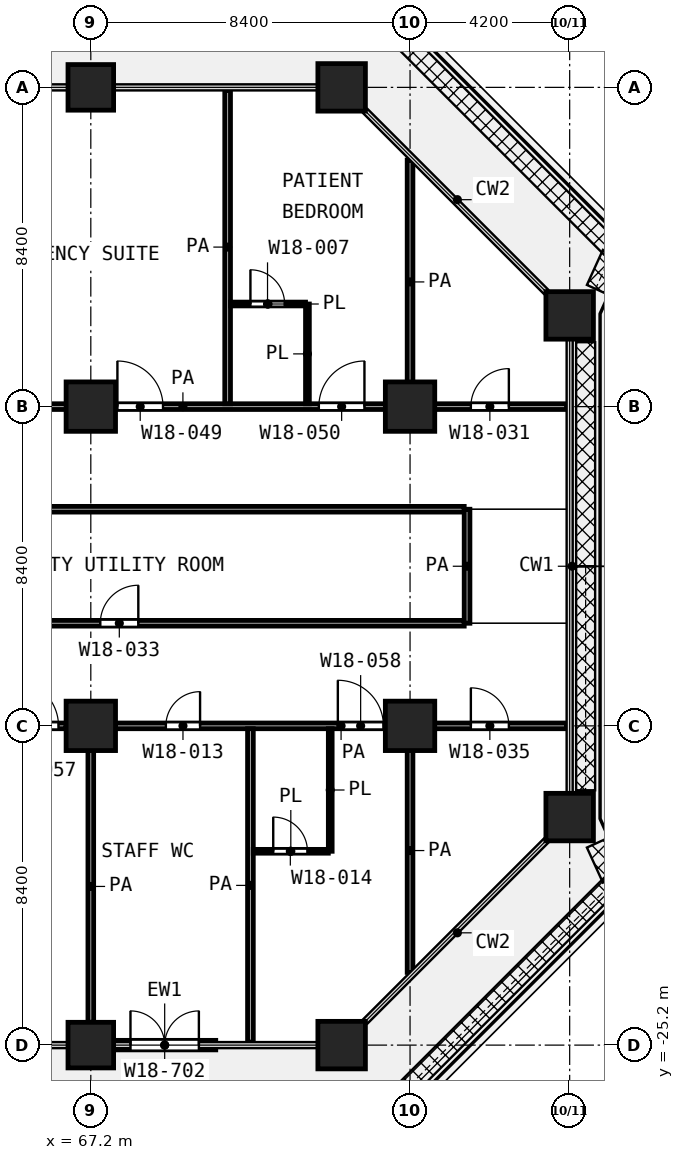
"""IFC4 building model, lengths in metres.
Left out: names, types, materials, properties, quantities, classifications, styles, units other than length and angle.
Written with IfcOpenShell. Run it as: python <this file> out.ifc"""

import sys

from ifc_helpers import new_model, si_unit, direction, frame, frame_2d, origin, origin_2d, place, context, subcontext, project, spatial, rectangle, extrude, element, fill, save


model = new_model("IFC4")
c1 = context("Model", 3, precision=1e-05, world=origin(), true_north=direction((0.0, 1.0)))
c2 = subcontext(c1, "Body", "Model", "MODEL_VIEW")
j1 = project(units=[si_unit("LENGTHUNIT", "METRE"), si_unit("PLANEANGLEUNIT", "RADIAN")], contexts=[c1])
p1 = place(None, origin())
s1 = spatial("IfcSite", under=j1, at=p1, CompositionType="ELEMENT")
p2 = place(p1, origin())
s2 = spatial("IfcBuilding", under=s1, at=p2, CompositionType="ELEMENT")
p3 = place(p2, frame((0.0, 0.0, 81.2)))
s3 = spatial("IfcBuildingStorey", under=s2, at=p3, CompositionType="ELEMENT", Elevation=81.2)
p4 = place(p3, frame((67.2, 0.0, 0.0), z_axis=(0.0, 0.0, 1.0), x_axis=(1.0, 0.0, 0.0)))
e1 = element("IfcColumn", 1, at=p4, inside=s3, PredefinedType="COLUMN", context=c2, shape_type="SweptSolid", body=[
    extrude(rectangle(XDim=1.2, YDim=1.2, at=origin_2d()), origin(), (0.0, 0.0, 1.0), 4.2),
])
for number, where, z_axis, x_axis in (
    (2, (73.8, 0.0, 0.0), (0.0, 0.0, 1.0), (1.0, 0.0, 0.0)),
    (3, (79.8, -6.0, 0.0), (0.0, 0.0, 1.0), (1.0, 0.0, 0.0)),
):
    element("IfcColumn", number, at=place(p3, frame(where, z_axis=z_axis, x_axis=x_axis)), inside=s3, PredefinedType="COLUMN", context=c2, shape_type="SweptSolid", body=[
        extrude(rectangle(XDim=1.25, YDim=1.25, at=origin_2d()), origin(), (0.0, 0.0, 1.0), 4.2),
    ])
for number, where, z_axis, x_axis in (
    (4, (67.2, -8.4, 0.0), (0.0, 0.0, 1.0), (1.0, 0.0, 0.0)),
    (5, (75.6, -8.4, 0.0), (0.0, 0.0, 1.0), (1.0, 0.0, 0.0)),
    (6, (67.2, -16.8, 0.0), (0.0, 0.0, 1.0), (1.0, 0.0, 0.0)),
    (7, (75.6, -16.8, 0.0), (0.0, 0.0, 1.0), (1.0, 0.0, 0.0)),
):
    element("IfcColumn", number, at=place(p3, frame(where, z_axis=z_axis, x_axis=x_axis)), inside=s3, PredefinedType="COLUMN", context=c2, shape_type="SweptSolid", body=[
        extrude(rectangle(XDim=1.3, YDim=1.3, at=origin_2d()), origin(), (0.0, 0.0, 1.0), 4.2),
    ])
p5 = place(p3, frame((79.8, -19.2, 0.0), z_axis=(0.0, 0.0, 1.0), x_axis=(1.0, 0.0, 0.0)))
e8 = element("IfcColumn", 8, at=p5, inside=s3, PredefinedType="COLUMN", context=c2, shape_type="SweptSolid", body=[
    extrude(rectangle(XDim=1.25, YDim=1.25, at=origin_2d()), origin(), (0.0, 0.0, 1.0), 4.2),
])
p6 = place(p3, frame((67.2, -25.2, 0.0), z_axis=(0.0, 0.0, 1.0), x_axis=(1.0, 0.0, 0.0)))
e9 = element("IfcColumn", 9, at=p6, inside=s3, PredefinedType="COLUMN", context=c2, shape_type="SweptSolid", body=[
    extrude(rectangle(XDim=1.2, YDim=1.2, at=origin_2d()), origin(), (0.0, 0.0, 1.0), 4.2),
])
p7 = place(p3, frame((73.8, -25.2, 0.0), z_axis=(0.0, 0.0, 1.0), x_axis=(1.0, 0.0, 0.0)))
e10 = element("IfcColumn", 10, at=p7, inside=s3, PredefinedType="COLUMN", context=c2, shape_type="SweptSolid", body=[
    extrude(rectangle(XDim=1.25, YDim=1.25, at=origin_2d()), origin(), (0.0, 0.0, 1.0), 4.2),
])
p8 = place(p3, frame((67.8, -25.2, 0.0), z_axis=(0.0, 0.0, 1.0), x_axis=(1.0, 0.0, 0.0)))
e11 = element("IfcWall", 11, at=p8, inside=s3, PredefinedType="SOLIDWALL", context=c2, shape_type="SweptSolid", body=[
    extrude(rectangle(XDim=2.688, YDim=0.25, at=frame_2d((1.344, 0.0))), origin(), (0.0, 0.0, 1.0), 3.78),
])
p9 = place(p8, frame((0.444, 0.0, 0.0)))
e12 = element("IfcOpeningElement", 12, at=p9, cuts=e11, PredefinedType="OPENING", context=c2, shape_type="SweptSolid", body=[
    extrude(rectangle(XDim=1.8, YDim=2.1, at=frame_2d((0.9, 1.05))), frame((0.0, 0.135, 0.0), z_axis=(0.0, -1.0, 0.0), x_axis=(1.0, 0.0, 0.0)), (0.0, 0.0, 1.0), 0.27),
])
p10 = place(p3, frame((71.475, -20.1, 0.0), z_axis=(0.0, 0.0, 1.0), x_axis=(1.0, 0.0, 0.0)))
e13 = element("IfcWall", 13, at=p10, inside=s3, PredefinedType="PARTITIONING", context=c2, shape_type="SweptSolid", body=[
    extrude(rectangle(XDim=1.975, YDim=0.1, at=frame_2d((0.987, 0.0))), origin(), (0.0, 0.0, 1.0), 3.9),
])
p11 = place(p10, frame((0.525, 0.0, 0.0)))
e14 = element("IfcOpeningElement", 14, at=p11, cuts=e13, PredefinedType="OPENING", context=c2, shape_type="SweptSolid", body=[
    extrude(rectangle(XDim=0.9, YDim=2.1, at=frame_2d((0.45, 1.05))), frame((0.0, 0.06, 0.0), z_axis=(0.0, -1.0, 0.0), x_axis=(1.0, 0.0, 0.0)), (0.0, 0.0, 1.0), 0.12),
])
p12 = place(p3, frame((70.875, -5.7, 0.0), z_axis=(0.0, 0.0, 1.0), x_axis=(1.0, 0.0, 0.0)))
e15 = element("IfcWall", 15, at=p12, inside=s3, PredefinedType="PARTITIONING", context=c2, shape_type="SweptSolid", body=[
    extrude(rectangle(XDim=1.975, YDim=0.1, at=frame_2d((0.988, 0.0))), origin(), (0.0, 0.0, 1.0), 3.9),
])
p13 = place(p12, frame((0.525, 0.0, 0.0)))
e16 = element("IfcOpeningElement", 16, at=p13, cuts=e15, PredefinedType="OPENING", context=c2, shape_type="SweptSolid", body=[
    extrude(rectangle(XDim=0.9, YDim=2.1, at=frame_2d((0.45, 1.05))), frame((0.0, 0.06, 0.0), z_axis=(0.0, -1.0, 0.0), x_axis=(1.0, 0.0, 0.0)), (0.0, 0.0, 1.0), 0.12),
])
p14 = place(p3, frame((72.9, -8.325, 0.0), z_axis=(0.0, 0.0, 1.0), x_axis=(0.0, 1.0, 0.0)))
e17 = element("IfcWall", 17, at=p14, inside=s3, PredefinedType="PARTITIONING", context=c2, shape_type="SweptSolid", body=[
    extrude(rectangle(XDim=2.625, YDim=0.1, at=frame_2d((1.312, 0.0))), origin(), (0.0, 0.0, 1.0), 3.9),
])
p15 = place(p3, frame((73.5, -20.1, 0.0), z_axis=(0.0, 0.0, 1.0), x_axis=(0.0, 1.0, 0.0)))
e18 = element("IfcWall", 18, at=p15, inside=s3, PredefinedType="PARTITIONING", context=c2, shape_type="SweptSolid", body=[
    extrude(rectangle(XDim=3.225, YDim=0.1, at=frame_2d((1.613, 0.0))), origin(), (0.0, 0.0, 1.0), 3.9),
])
p16 = place(p3, frame((25.1, -16.8, 0.0), z_axis=(0.0, 0.0, 1.0), x_axis=(1.0, 0.0, 0.0)))
e19 = element("IfcWall", 19, at=p16, inside=s3, PredefinedType="PARTITIONING", context=c2, shape_type="SweptSolid", body=[
    extrude(rectangle(XDim=41.45, YDim=0.15, at=frame_2d((20.725, 0.0))), origin(), (0.0, 0.0, 1.0), 3.9),
])
p17 = place(p16, frame((1.45, 0.0, 0.0)))
e20 = element("IfcOpeningElement", 20, at=p17, cuts=e19, PredefinedType="OPENING", context=c2, shape_type="SweptSolid", body=[
    extrude(rectangle(XDim=1.5, YDim=2.1, at=frame_2d((0.75, 1.05))), frame((0.0, 0.085, 0.0), z_axis=(0.0, -1.0, 0.0), x_axis=(1.0, 0.0, 0.0)), (0.0, 0.0, 1.0), 0.17),
])
p18 = place(p16, frame((5.9, 0.0, 0.0)))
e21 = element("IfcOpeningElement", 21, at=p18, cuts=e19, PredefinedType="OPENING", context=c2, shape_type="SweptSolid", body=[
    extrude(rectangle(XDim=1.0, YDim=2.1, at=frame_2d((0.5, 1.05))), frame((0.0, 0.085, 0.0), z_axis=(0.0, -1.0, 0.0), x_axis=(1.0, 0.0, 0.0)), (0.0, 0.0, 1.0), 0.17),
])
p19 = place(p16, frame((10.3, 0.0, 0.0)))
e22 = element("IfcOpeningElement", 22, at=p19, cuts=e19, PredefinedType="OPENING", context=c2, shape_type="SweptSolid", body=[
    extrude(rectangle(XDim=1.2, YDim=2.1, at=frame_2d((0.6, 1.05))), frame((0.0, 0.085, 0.0), z_axis=(0.0, -1.0, 0.0), x_axis=(1.0, 0.0, 0.0)), (0.0, 0.0, 1.0), 0.17),
])
p20 = place(p16, frame((15.0, 0.0, 0.0)))
e23 = element("IfcOpeningElement", 23, at=p20, cuts=e19, PredefinedType="OPENING", context=c2, shape_type="SweptSolid", body=[
    extrude(rectangle(XDim=1.2, YDim=2.1, at=frame_2d((0.6, 1.05))), frame((0.0, 0.085, 0.0), z_axis=(0.0, -1.0, 0.0), x_axis=(1.0, 0.0, 0.0)), (0.0, 0.0, 1.0), 0.17),
])
p21 = place(p16, frame((13.55, 0.0, 0.0)))
e24 = element("IfcOpeningElement", 24, at=p21, cuts=e19, PredefinedType="OPENING", context=c2, shape_type="SweptSolid", body=[
    extrude(rectangle(XDim=1.1, YDim=2.1, at=frame_2d((0.55, 1.05))), frame((0.0, 0.085, 0.0), z_axis=(0.0, -1.0, 0.0), x_axis=(1.0, 0.0, 0.0)), (0.0, 0.0, 1.0), 0.17),
])
p22 = place(p16, frame((23.4, 0.0, 0.0)))
e25 = element("IfcOpeningElement", 25, at=p22, cuts=e19, PredefinedType="OPENING", context=c2, shape_type="SweptSolid", body=[
    extrude(rectangle(XDim=1.2, YDim=2.1, at=frame_2d((0.6, 1.05))), frame((0.0, 0.085, 0.0), z_axis=(0.0, -1.0, 0.0), x_axis=(1.0, 0.0, 0.0)), (0.0, 0.0, 1.0), 0.17),
])
p23 = place(p16, frame((26.3, 0.0, 0.0)))
e26 = element("IfcOpeningElement", 26, at=p23, cuts=e19, PredefinedType="OPENING", context=c2, shape_type="SweptSolid", body=[
    extrude(rectangle(XDim=1.2, YDim=2.1, at=frame_2d((0.6, 1.05))), frame((0.0, 0.085, 0.0), z_axis=(0.0, -1.0, 0.0), x_axis=(1.0, 0.0, 0.0)), (0.0, 0.0, 1.0), 0.17),
])
p24 = place(p16, frame((34.9, 0.0, 0.0)))
e27 = element("IfcOpeningElement", 27, at=p24, cuts=e19, PredefinedType="OPENING", context=c2, shape_type="SweptSolid", body=[
    extrude(rectangle(XDim=1.2, YDim=2.1, at=frame_2d((0.6, 1.05))), frame((0.0, 0.085, 0.0), z_axis=(0.0, -1.0, 0.0), x_axis=(1.0, 0.0, 0.0)), (0.0, 0.0, 1.0), 0.17),
])
p25 = place(p16, frame((32.1, 0.0, 0.0)))
e28 = element("IfcOpeningElement", 28, at=p25, cuts=e19, PredefinedType="OPENING", context=c2, shape_type="SweptSolid", body=[
    extrude(rectangle(XDim=0.9, YDim=2.1, at=frame_2d((0.45, 1.05))), frame((0.0, 0.085, 0.0), z_axis=(0.0, -1.0, 0.0), x_axis=(1.0, 0.0, 0.0)), (0.0, 0.0, 1.0), 0.17),
])
p26 = place(p16, frame((40.05, 0.0, 0.0)))
e29 = element("IfcOpeningElement", 29, at=p26, cuts=e19, PredefinedType="OPENING", context=c2, shape_type="SweptSolid", body=[
    extrude(rectangle(XDim=1.2, YDim=2.1, at=frame_2d((0.6, 1.05))), frame((0.0, 0.085, 0.0), z_axis=(0.0, -1.0, 0.0), x_axis=(1.0, 0.0, 0.0)), (0.0, 0.0, 1.0), 0.17),
])
p27 = place(p3, frame((67.85, -16.8, 0.0), z_axis=(0.0, 0.0, 1.0), x_axis=(1.0, 0.0, 0.0)))
e30 = element("IfcWall", 30, at=p27, inside=s3, PredefinedType="PARTITIONING", context=c2, shape_type="SweptSolid", body=[
    extrude(rectangle(XDim=11.87, YDim=0.15, at=frame_2d((5.935, 0.0))), origin(), (0.0, 0.0, 1.0), 3.9),
])
p28 = place(p27, frame((1.325, 0.0, 0.0)))
e31 = element("IfcOpeningElement", 31, at=p28, cuts=e30, PredefinedType="OPENING", context=c2, shape_type="SweptSolid", body=[
    extrude(rectangle(XDim=0.9, YDim=2.1, at=frame_2d((0.45, 1.05))), frame((0.0, 0.085, 0.0), z_axis=(0.0, -1.0, 0.0), x_axis=(1.0, 0.0, 0.0)), (0.0, 0.0, 1.0), 0.17),
])
p29 = place(p27, frame((5.85, 0.0, 0.0)))
e32 = element("IfcOpeningElement", 32, at=p29, cuts=e30, PredefinedType="OPENING", context=c2, shape_type="SweptSolid", body=[
    extrude(rectangle(XDim=1.2, YDim=2.1, at=frame_2d((0.6, 1.05))), frame((0.0, 0.085, 0.0), z_axis=(0.0, -1.0, 0.0), x_axis=(1.0, 0.0, 0.0)), (0.0, 0.0, 1.0), 0.17),
])
p30 = place(p27, frame((9.35, 0.0, 0.0)))
e33 = element("IfcOpeningElement", 33, at=p30, cuts=e30, PredefinedType="OPENING", context=c2, shape_type="SweptSolid", body=[
    extrude(rectangle(XDim=1.0, YDim=2.1, at=frame_2d((0.5, 1.05))), frame((0.0, 0.085, 0.0), z_axis=(0.0, -1.0, 0.0), x_axis=(1.0, 0.0, 0.0)), (0.0, 0.0, 1.0), 0.17),
])
p31 = place(p3, frame((29.475, -14.1, 0.0), z_axis=(0.0, 0.0, 1.0), x_axis=(1.0, 0.0, 0.0)))
e34 = element("IfcWall", 34, at=p31, inside=s3, PredefinedType="PARTITIONING", context=c2, shape_type="SweptSolid", body=[
    extrude(rectangle(XDim=47.55, YDim=0.15, at=frame_2d((23.775, 0.0))), origin(), (0.0, 0.0, 1.0), 3.9),
])
p32 = place(p31, frame((7.825, 0.0, 0.0)))
e35 = element("IfcOpeningElement", 35, at=p32, cuts=e34, PredefinedType="OPENING", context=c2, shape_type="SweptSolid", body=[
    extrude(rectangle(XDim=1.0, YDim=2.1, at=frame_2d((0.5, 1.05))), frame((0.0, 0.085, 0.0), z_axis=(0.0, -1.0, 0.0), x_axis=(1.0, 0.0, 0.0)), (0.0, 0.0, 1.0), 0.17),
])
p33 = place(p31, frame((22.425, 0.0, 0.0)))
e36 = element("IfcOpeningElement", 36, at=p33, cuts=e34, PredefinedType="OPENING", context=c2, shape_type="SweptSolid", body=[
    extrude(rectangle(XDim=1.2, YDim=2.1, at=frame_2d((0.6, 1.05))), frame((0.0, 0.085, 0.0), z_axis=(0.0, -1.0, 0.0), x_axis=(1.0, 0.0, 0.0)), (0.0, 0.0, 1.0), 0.17),
])
p34 = place(p31, frame((37.975, 0.0, 0.0)))
e37 = element("IfcOpeningElement", 37, at=p34, cuts=e34, PredefinedType="OPENING", context=c2, shape_type="SweptSolid", body=[
    extrude(rectangle(XDim=1.0, YDim=2.1, at=frame_2d((0.5, 1.05))), frame((0.0, 0.085, 0.0), z_axis=(0.0, -1.0, 0.0), x_axis=(1.0, 0.0, 0.0)), (0.0, 0.0, 1.0), 0.17),
])
p35 = place(p3, frame((29.475, -11.1, 0.0), z_axis=(0.0, 0.0, 1.0), x_axis=(1.0, 0.0, 0.0)))
e38 = element("IfcWall", 38, at=p35, inside=s3, PredefinedType="PARTITIONING", context=c2, shape_type="SweptSolid", body=[
    extrude(rectangle(XDim=47.55, YDim=0.15, at=frame_2d((23.775, 0.0))), origin(), (0.0, 0.0, 1.0), 3.9),
])
p36 = place(p3, frame((59.527, -8.4, 0.0), z_axis=(0.0, 0.0, 1.0), x_axis=(1.0, 0.0, 0.0)))
e39 = element("IfcWall", 39, at=p36, inside=s3, PredefinedType="PARTITIONING", context=c2, shape_type="SweptSolid", body=[
    extrude(rectangle(XDim=20.193, YDim=0.15, at=frame_2d((10.096, 0.0))), origin(), (0.0, 0.0, 1.0), 3.9),
])
p37 = place(p36, frame((4.073, 0.0, 0.0)))
e40 = element("IfcOpeningElement", 40, at=p37, cuts=e39, PredefinedType="OPENING", context=c2, shape_type="SweptSolid", body=[
    extrude(rectangle(XDim=1.2, YDim=2.1, at=frame_2d((0.6, 1.05))), frame((0.0, 0.085, 0.0), z_axis=(0.0, -1.0, 0.0), x_axis=(1.0, 0.0, 0.0)), (0.0, 0.0, 1.0), 0.17),
])
p38 = place(p36, frame((8.373, 0.0, 0.0)))
e41 = element("IfcOpeningElement", 41, at=p38, cuts=e39, PredefinedType="OPENING", context=c2, shape_type="SweptSolid", body=[
    extrude(rectangle(XDim=1.2, YDim=2.1, at=frame_2d((0.6, 1.05))), frame((0.0, 0.085, 0.0), z_axis=(0.0, -1.0, 0.0), x_axis=(1.0, 0.0, 0.0)), (0.0, 0.0, 1.0), 0.17),
])
p39 = place(p36, frame((13.673, 0.0, 0.0)))
e42 = element("IfcOpeningElement", 42, at=p39, cuts=e39, PredefinedType="OPENING", context=c2, shape_type="SweptSolid", body=[
    extrude(rectangle(XDim=1.2, YDim=2.1, at=frame_2d((0.6, 1.05))), frame((0.0, 0.085, 0.0), z_axis=(0.0, -1.0, 0.0), x_axis=(1.0, 0.0, 0.0)), (0.0, 0.0, 1.0), 0.17),
])
p40 = place(p36, frame((17.673, 0.0, 0.0)))
e43 = element("IfcOpeningElement", 43, at=p40, cuts=e39, PredefinedType="OPENING", context=c2, shape_type="SweptSolid", body=[
    extrude(rectangle(XDim=1.0, YDim=2.1, at=frame_2d((0.5, 1.05))), frame((0.0, 0.085, 0.0), z_axis=(0.0, -1.0, 0.0), x_axis=(1.0, 0.0, 0.0)), (0.0, 0.0, 1.0), 0.17),
])
p41 = place(p3, frame((67.2, -24.6, 0.0), z_axis=(0.0, 0.0, 1.0), x_axis=(0.0, 1.0, 0.0)))
e44 = element("IfcWall", 44, at=p41, inside=s3, PredefinedType="PARTITIONING", context=c2, shape_type="SweptSolid", body=[
    extrude(rectangle(XDim=7.15, YDim=0.15, at=frame_2d((3.575, 0.0))), origin(), (0.0, 0.0, 1.0), 3.9),
])
p42 = place(p3, frame((70.8, -8.325, 0.0), z_axis=(0.0, 0.0, 1.0), x_axis=(0.0, 1.0, 0.0)))
e45 = element("IfcWall", 45, at=p42, inside=s3, PredefinedType="PARTITIONING", context=c2, shape_type="SweptSolid", body=[
    extrude(rectangle(XDim=8.245, YDim=0.15, at=frame_2d((4.123, 0.0))), origin(), (0.0, 0.0, 1.0), 3.9),
])
p43 = place(p3, frame((71.4, -25.12, 0.0), z_axis=(0.0, 0.0, 1.0), x_axis=(0.0, 1.0, 0.0)))
e46 = element("IfcWall", 46, at=p43, inside=s3, PredefinedType="PARTITIONING", context=c2, shape_type="SweptSolid", body=[
    extrude(rectangle(XDim=8.245, YDim=0.15, at=frame_2d((4.123, 0.0))), origin(), (0.0, 0.0, 1.0), 3.9),
])
p44 = place(p3, frame((75.6, -23.287, 0.0), z_axis=(0.0, 0.0, 1.0), x_axis=(0.0, 1.0, 0.0)))
e47 = element("IfcWall", 47, at=p44, inside=s3, PredefinedType="PARTITIONING", context=c2, shape_type="SweptSolid", body=[
    extrude(rectangle(XDim=6.412, YDim=0.15, at=frame_2d((3.206, 0.0))), origin(), (0.0, 0.0, 1.0), 3.9),
])
p45 = place(p3, frame((75.6, -8.325, 0.0), z_axis=(0.0, 0.0, 1.0), x_axis=(0.0, 1.0, 0.0)))
e48 = element("IfcWall", 48, at=p45, inside=s3, PredefinedType="PARTITIONING", context=c2, shape_type="SweptSolid", body=[
    extrude(rectangle(XDim=6.412, YDim=0.15, at=frame_2d((3.206, 0.0))), origin(), (0.0, 0.0, 1.0), 3.9),
])
p46 = place(p3, frame((77.1, -14.1, 0.0), z_axis=(0.0, 0.0, 1.0), x_axis=(0.0, 1.0, 0.0)))
e49 = element("IfcWall", 49, at=p46, inside=s3, PredefinedType="PARTITIONING", context=c2, shape_type="SweptSolid", body=[
    extrude(rectangle(XDim=3.0, YDim=0.15, at=frame_2d((1.5, 0.0))), origin(), (0.0, 0.0, 1.0), 3.9),
])
p47 = place(p9, origin())
e50 = element("IfcDoor", 50, at=p47, inside=s3, OperationType="DOUBLE_DOOR_SINGLE_SWING", PredefinedType="DOOR", context=c2, shape_type="SweptSolid", body=[
    extrude(rectangle(XDim=1.8, YDim=2.1, at=frame_2d((0.9, 1.05))), frame((0.0, 0.025, 0.0), z_axis=(0.0, -1.0, 0.0), x_axis=(1.0, 0.0, 0.0)), (0.0, 0.0, 1.0), 0.05),
])
fill(e12, e50)
p48 = place(p38, origin())
e51 = element("IfcDoor", 51, at=p48, inside=s3, OperationType="SINGLE_SWING_LEFT", PredefinedType="DOOR", context=c2, shape_type="SweptSolid", body=[
    extrude(rectangle(XDim=1.2, YDim=2.1, at=frame_2d((0.6, 1.05))), frame((0.0, 0.025, 0.0), z_axis=(0.0, -1.0, 0.0), x_axis=(1.0, 0.0, 0.0)), (0.0, 0.0, 1.0), 0.05),
])
fill(e41, e51)
p49 = place(p39, origin())
e52 = element("IfcDoor", 52, at=p49, inside=s3, OperationType="SINGLE_SWING_RIGHT", PredefinedType="DOOR", context=c2, shape_type="SweptSolid", body=[
    extrude(rectangle(XDim=1.2, YDim=2.1, at=frame_2d((0.6, 1.05))), frame((0.0, 0.025, 0.0), z_axis=(0.0, -1.0, 0.0), x_axis=(1.0, 0.0, 0.0)), (0.0, 0.0, 1.0), 0.05),
])
fill(e42, e52)
p50 = place(p13, origin())
e53 = element("IfcDoor", 53, at=p50, inside=s3, OperationType="SINGLE_SWING_LEFT", PredefinedType="DOOR", context=c2, shape_type="SweptSolid", body=[
    extrude(rectangle(XDim=0.9, YDim=2.1, at=frame_2d((0.45, 1.05))), frame((0.0, 0.025, 0.0), z_axis=(0.0, -1.0, 0.0), x_axis=(1.0, 0.0, 0.0)), (0.0, 0.0, 1.0), 0.05),
])
fill(e16, e53)
p51 = place(p40, origin())
e54 = element("IfcDoor", 54, at=p51, inside=s3, OperationType="SINGLE_SWING_RIGHT", PredefinedType="DOOR", context=c2, shape_type="SweptSolid", body=[
    extrude(rectangle(XDim=1.0, YDim=2.1, at=frame_2d((0.5, 1.05))), frame((0.0, 0.025, 0.0), z_axis=(0.0, -1.0, 0.0), x_axis=(1.0, 0.0, 0.0)), (0.0, 0.0, 1.0), 0.05),
])
fill(e43, e54)
p52 = place(p34, origin())
e55 = element("IfcDoor", 55, at=p52, inside=s3, OperationType="SINGLE_SWING_RIGHT", PredefinedType="DOOR", context=c2, shape_type="SweptSolid", body=[
    extrude(rectangle(XDim=1.0, YDim=2.1, at=frame_2d((0.5, 1.05))), frame((0.0, 0.025, 0.0), z_axis=(0.0, -1.0, 0.0), x_axis=(1.0, 0.0, 0.0)), (0.0, 0.0, 1.0), 0.05),
])
fill(e37, e55)
p53 = place(p26, origin())
e56 = element("IfcDoor", 56, at=p53, inside=s3, OperationType="SINGLE_SWING_LEFT", PredefinedType="DOOR", context=c2, shape_type="SweptSolid", body=[
    extrude(rectangle(XDim=1.2, YDim=2.1, at=frame_2d((0.6, 1.05))), frame((0.0, 0.025, 0.0), z_axis=(0.0, -1.0, 0.0), x_axis=(1.0, 0.0, 0.0)), (0.0, 0.0, 1.0), 0.05),
])
fill(e29, e56)
p54 = place(p28, origin())
e57 = element("IfcDoor", 57, at=p54, inside=s3, OperationType="SINGLE_SWING_RIGHT", PredefinedType="DOOR", context=c2, shape_type="SweptSolid", body=[
    extrude(rectangle(XDim=0.9, YDim=2.1, at=frame_2d((0.45, 1.05))), frame((0.0, 0.025, 0.0), z_axis=(0.0, -1.0, 0.0), x_axis=(1.0, 0.0, 0.0)), (0.0, 0.0, 1.0), 0.05),
])
fill(e31, e57)
p55 = place(p29, origin())
e58 = element("IfcDoor", 58, at=p55, inside=s3, OperationType="SINGLE_SWING_LEFT", PredefinedType="DOOR", context=c2, shape_type="SweptSolid", body=[
    extrude(rectangle(XDim=1.2, YDim=2.1, at=frame_2d((0.6, 1.05))), frame((0.0, 0.025, 0.0), z_axis=(0.0, -1.0, 0.0), x_axis=(1.0, 0.0, 0.0)), (0.0, 0.0, 1.0), 0.05),
])
fill(e32, e58)
p56 = place(p11, origin())
e59 = element("IfcDoor", 59, at=p56, inside=s3, OperationType="SINGLE_SWING_LEFT", PredefinedType="DOOR", context=c2, shape_type="SweptSolid", body=[
    extrude(rectangle(XDim=0.9, YDim=2.1, at=frame_2d((0.45, 1.05))), frame((0.0, 0.025, 0.0), z_axis=(0.0, -1.0, 0.0), x_axis=(1.0, 0.0, 0.0)), (0.0, 0.0, 1.0), 0.05),
])
fill(e14, e59)
p57 = place(p30, origin())
e60 = element("IfcDoor", 60, at=p57, inside=s3, OperationType="SINGLE_SWING_LEFT", PredefinedType="DOOR", context=c2, shape_type="SweptSolid", body=[
    extrude(rectangle(XDim=1.0, YDim=2.1, at=frame_2d((0.5, 1.05))), frame((0.0, 0.025, 0.0), z_axis=(0.0, -1.0, 0.0), x_axis=(1.0, 0.0, 0.0)), (0.0, 0.0, 1.0), 0.05),
])
fill(e33, e60)
save(model, sys.argv[1])
